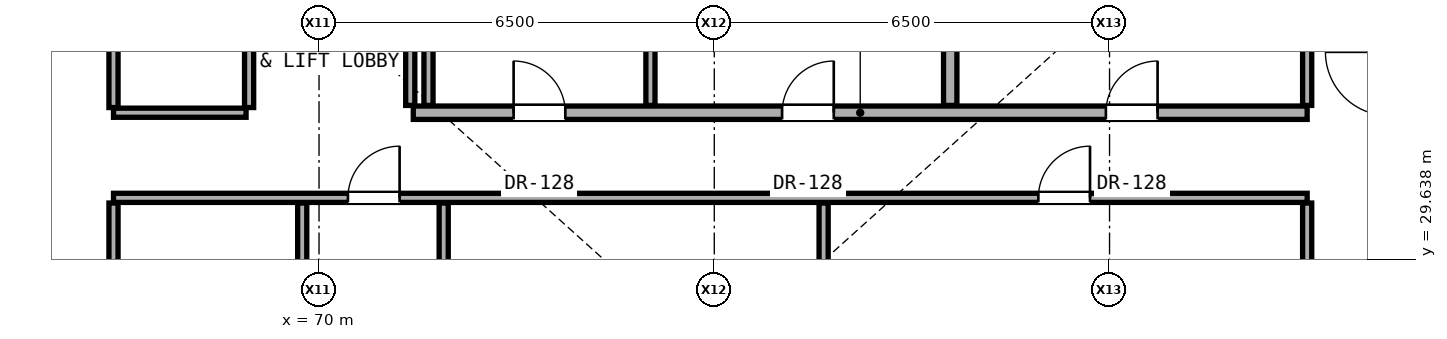
"""IFC4 building model, lengths in metres.
Left out: names, types, materials, properties, quantities, classifications, styles, units other than length and angle.
Written with IfcOpenShell. Run it as: python <this file> out.ifc"""

import sys

from ifc_helpers import new_model, si_unit, direction, frame, frame_2d, origin, place, context, subcontext, project, spatial, rectangle, extrude, element, fill, save


model = new_model("IFC4")
c1 = context("Model", 3, precision=1e-05, world=origin(), true_north=direction((0.0, 1.0)))
c2 = subcontext(c1, "Body", "Model", "MODEL_VIEW")
j1 = project(units=[si_unit("LENGTHUNIT", "METRE"), si_unit("PLANEANGLEUNIT", "RADIAN")], contexts=[c1])
p1 = place(None, origin())
s1 = spatial("IfcSite", under=j1, at=p1, CompositionType="ELEMENT")
p2 = place(p1, origin())
s2 = spatial("IfcBuilding", under=s1, at=p2, CompositionType="ELEMENT")
p3 = place(p2, frame((0.0, 0.0, 22.4)))
s3 = spatial("IfcBuildingStorey", under=s2, at=p3, CompositionType="ELEMENT", Elevation=22.4)
p4 = place(p3, frame((66.62, 30.65, 0.0), z_axis=(0.0, 0.0, 1.0), x_axis=(1.0, 0.0, 0.0)))
e1 = element("IfcWall", 1, at=p4, inside=s3, PredefinedType="PARTITIONING", context=c2, shape_type="SweptSolid", body=[
    extrude(rectangle(XDim=19.63, YDim=0.15, at=frame_2d((9.815, 0.0))), origin(), (0.0, 0.0, 1.0), 2.125),
])
p5 = place(p4, frame((3.855, 0.0, 0.0)))
e2 = element("IfcOpeningElement", 2, at=p5, cuts=e1, PredefinedType="OPENING", context=c2, shape_type="SweptSolid", body=[
    extrude(rectangle(XDim=0.85, YDim=2.01, at=frame_2d((0.425, 1.005))), frame((0.0, 0.085, 0.0), z_axis=(0.0, -1.0, 0.0), x_axis=(1.0, 0.0, 0.0)), (0.0, 0.0, 1.0), 0.17),
])
p6 = place(p4, frame((15.209, 0.0, 0.0)))
e3 = element("IfcOpeningElement", 3, at=p6, cuts=e1, PredefinedType="OPENING", context=c2, shape_type="SweptSolid", body=[
    extrude(rectangle(XDim=0.85, YDim=2.01, at=frame_2d((0.425, 1.005))), frame((0.0, 0.085, 0.0), z_axis=(0.0, -1.0, 0.0), x_axis=(1.0, 0.0, 0.0)), (0.0, 0.0, 1.0), 0.17),
])
p7 = place(p3, frame((66.62, 32.05, 0.0), z_axis=(0.0, 0.0, 1.0), x_axis=(1.0, 0.0, 0.0)))
e4 = element("IfcWall", 4, at=p7, inside=s3, PredefinedType="PARTITIONING", context=c2, shape_type="SweptSolid", body=[
    extrude(rectangle(XDim=2.18, YDim=0.15, at=frame_2d((1.09, 0.0))), origin(), (0.0, 0.0, 1.0), 2.125),
])
p8 = place(p3, frame((71.55, 32.05, 0.0), z_axis=(0.0, 0.0, 1.0), x_axis=(1.0, 0.0, 0.0)))
e5 = element("IfcWall", 5, at=p8, inside=s3, PredefinedType="SOLIDWALL", context=c2, shape_type="SweptSolid", body=[
    extrude(rectangle(XDim=14.7, YDim=0.22, at=frame_2d((7.35, 0.0))), origin(), (0.0, 0.0, 1.0), 2.125),
])
p9 = place(p8, frame((11.39, 0.0, 0.0)))
e6 = element("IfcOpeningElement", 6, at=p9, cuts=e5, PredefinedType="OPENING", context=c2, shape_type="SweptSolid", body=[
    extrude(rectangle(XDim=0.85, YDim=2.01, at=frame_2d((0.425, 1.005))), frame((0.0, 0.12, 0.0), z_axis=(0.0, -1.0, 0.0), x_axis=(1.0, 0.0, 0.0)), (0.0, 0.0, 1.0), 0.24),
])
p10 = place(p8, frame((6.065, 0.0, 0.0)))
e7 = element("IfcOpeningElement", 7, at=p10, cuts=e5, PredefinedType="OPENING", context=c2, shape_type="SweptSolid", body=[
    extrude(rectangle(XDim=0.85, YDim=2.01, at=frame_2d((0.425, 1.005))), frame((0.0, 0.12, 0.0), z_axis=(0.0, -1.0, 0.0), x_axis=(1.0, 0.0, 0.0)), (0.0, 0.0, 1.0), 0.24),
])
p11 = place(p8, frame((1.65, 0.0, 0.0)))
e8 = element("IfcOpeningElement", 8, at=p11, cuts=e5, PredefinedType="OPENING", context=c2, shape_type="SweptSolid", body=[
    extrude(rectangle(XDim=0.85, YDim=2.01, at=frame_2d((0.425, 1.005))), frame((0.0, 0.12, 0.0), z_axis=(0.0, -1.0, 0.0), x_axis=(1.0, 0.0, 0.0)), (0.0, 0.0, 1.0), 0.24),
])
p12 = place(p3, frame((66.62, 24.935, 0.0), z_axis=(0.0, 0.0, 1.0), x_axis=(0.0, 1.0, 0.0)))
e9 = element("IfcWall", 9, at=p12, inside=s3, PredefinedType="PARTITIONING", context=c2, shape_type="SweptSolid", body=[
    extrude(rectangle(XDim=5.63, YDim=0.15, at=frame_2d((2.815, 0.0))), origin(), (0.0, 0.0, 1.0), 2.279),
])
p13 = place(p12, frame((2.34, 0.0, 0.0)))
e10 = element("IfcOpeningElement", 10, at=p13, cuts=e9, PredefinedType="OPENING", context=c2, shape_type="SweptSolid", body=[
    extrude(rectangle(XDim=0.95, YDim=2.15, at=frame_2d((0.475, 1.075))), frame((0.0, 0.085, 0.0), z_axis=(0.0, -1.0, 0.0), x_axis=(1.0, 0.0, 0.0)), (0.0, 0.0, 1.0), 0.17),
])
p14 = place(p3, frame((66.62, 32.135, 0.0), z_axis=(0.0, 0.0, 1.0), x_axis=(0.0, 1.0, 0.0)))
e11 = element("IfcWall", 11, at=p14, inside=s3, PredefinedType="PARTITIONING", context=c2, shape_type="SweptSolid", body=[
    extrude(rectangle(XDim=3.48, YDim=0.15, at=frame_2d((1.74, 0.0))), origin(), (0.0, 0.0, 1.0), 2.452),
])
p15 = place(p3, frame((68.85, 32.135, 0.0), z_axis=(0.0, 0.0, 1.0), x_axis=(0.0, 1.0, 0.0)))
e12 = element("IfcWall", 12, at=p15, inside=s3, PredefinedType="PARTITIONING", context=c2, shape_type="SweptSolid", body=[
    extrude(rectangle(XDim=2.695, YDim=0.15, at=frame_2d((1.348, 0.0))), origin(), (0.0, 0.0, 1.0), 3.06),
])
p16 = place(p3, frame((69.723, 24.935, 0.0), z_axis=(0.0, 0.0, 1.0), x_axis=(0.0, 1.0, 0.0)))
e13 = element("IfcWall", 13, at=p16, inside=s3, PredefinedType="PARTITIONING", context=c2, shape_type="SweptSolid", body=[
    extrude(rectangle(XDim=5.63, YDim=0.15, at=frame_2d((2.815, 0.0))), origin(), (0.0, 0.0, 1.0), 2.125),
])
for number, where, z_axis, x_axis in (
    (14, (71.5, 32.17, 0.0), (0.0, 0.0, 1.0), (0.0, 1.0, 0.0)),
    (15, (71.8, 32.17, 0.0), (0.0, 0.0, 1.0), (0.0, 1.0, 0.0)),
):
    element("IfcWall", number, at=place(p3, frame(where, z_axis=z_axis, x_axis=x_axis)), inside=s3, PredefinedType="PARTITIONING", context=c2, shape_type="SweptSolid", body=[
        extrude(rectangle(XDim=2.66, YDim=0.15, at=frame_2d((1.33, 0.0))), origin(), (0.0, 0.0, 1.0), 3.06),
    ])
p17 = place(p3, frame((72.05, 22.435, 0.0), z_axis=(0.0, 0.0, 1.0), x_axis=(0.0, 1.0, 0.0)))
e16 = element("IfcWall", 16, at=p17, inside=s3, PredefinedType="PARTITIONING", context=c2, shape_type="SweptSolid", body=[
    extrude(rectangle(XDim=8.13, YDim=0.15, at=frame_2d((4.065, 0.0))), origin(), (0.0, 0.0, 1.0), 2.125),
])
p18 = place(p3, frame((75.45, 32.17, 0.0), z_axis=(0.0, 0.0, 1.0), x_axis=(0.0, 1.0, 0.0)))
e17 = element("IfcWall", 17, at=p18, inside=s3, PredefinedType="PARTITIONING", context=c2, shape_type="SweptSolid", body=[
    extrude(rectangle(XDim=2.66, YDim=0.15, at=frame_2d((1.33, 0.0))), origin(), (0.0, 0.0, 1.0), 3.06),
])
p19 = place(p3, frame((78.298, 22.435, 0.0), z_axis=(0.0, 0.0, 1.0), x_axis=(0.0, 1.0, 0.0)))
e18 = element("IfcWall", 18, at=p19, inside=s3, PredefinedType="PARTITIONING", context=c2, shape_type="SweptSolid", body=[
    extrude(rectangle(XDim=8.13, YDim=0.15, at=frame_2d((4.065, 0.0))), origin(), (0.0, 0.0, 1.0), 2.125),
])
p20 = place(p3, frame((80.38, 32.17, 0.0), z_axis=(0.0, 0.0, 1.0), x_axis=(0.0, 1.0, 0.0)))
e19 = element("IfcWall", 19, at=p20, inside=s3, PredefinedType="SOLIDWALL", context=c2, shape_type="SweptSolid", body=[
    extrude(rectangle(XDim=2.66, YDim=0.22, at=frame_2d((1.33, 0.0))), origin(), (0.0, 0.0, 1.0), 3.06),
])
p21 = place(p3, frame((86.25, 22.435, 0.0), z_axis=(0.0, 0.0, 1.0), x_axis=(0.0, 1.0, 0.0)))
e20 = element("IfcWall", 20, at=p21, inside=s3, PredefinedType="PARTITIONING", context=c2, shape_type="SweptSolid", body=[
    extrude(rectangle(XDim=8.13, YDim=0.15, at=frame_2d((4.065, 0.0))), origin(), (0.0, 0.0, 1.0), 2.279),
])
p22 = place(p3, frame((86.25, 32.17, 0.0), z_axis=(0.0, 0.0, 1.0), x_axis=(0.0, 1.0, 0.0)))
e21 = element("IfcWall", 21, at=p22, inside=s3, PredefinedType="PARTITIONING", context=c2, shape_type="SweptSolid", body=[
    extrude(rectangle(XDim=2.795, YDim=0.15, at=frame_2d((1.397, 0.0))), origin(), (0.0, 0.0, 1.0), 2.452),
])
p23 = place(p9, origin())
e22 = element("IfcDoor", 22, at=p23, inside=s3, OperationType="SINGLE_SWING_RIGHT", PredefinedType="DOOR", context=c2, shape_type="SweptSolid", body=[
    extrude(rectangle(XDim=0.85, YDim=2.01, at=frame_2d((0.425, 1.005))), frame((0.0, 0.025, 0.0), z_axis=(0.0, -1.0, 0.0), x_axis=(1.0, 0.0, 0.0)), (0.0, 0.0, 1.0), 0.05),
])
fill(e6, e22)
p24 = place(p10, origin())
e23 = element("IfcDoor", 23, at=p24, inside=s3, OperationType="SINGLE_SWING_RIGHT", PredefinedType="DOOR", context=c2, shape_type="SweptSolid", body=[
    extrude(rectangle(XDim=0.85, YDim=2.01, at=frame_2d((0.425, 1.005))), frame((0.0, 0.025, 0.0), z_axis=(0.0, -1.0, 0.0), x_axis=(1.0, 0.0, 0.0)), (0.0, 0.0, 1.0), 0.05),
])
fill(e7, e23)
p25 = place(p11, origin())
e24 = element("IfcDoor", 24, at=p25, inside=s3, OperationType="SINGLE_SWING_LEFT", PredefinedType="DOOR", context=c2, shape_type="SweptSolid", body=[
    extrude(rectangle(XDim=0.85, YDim=2.01, at=frame_2d((0.425, 1.005))), frame((0.0, 0.025, 0.0), z_axis=(0.0, -1.0, 0.0), x_axis=(1.0, 0.0, 0.0)), (0.0, 0.0, 1.0), 0.05),
])
fill(e8, e24)
p26 = place(p5, origin())
e25 = element("IfcDoor", 25, at=p26, inside=s3, OperationType="SINGLE_SWING_RIGHT", PredefinedType="DOOR", context=c2, shape_type="SweptSolid", body=[
    extrude(rectangle(XDim=0.85, YDim=2.01, at=frame_2d((0.425, 1.005))), frame((0.0, 0.025, 0.0), z_axis=(0.0, -1.0, 0.0), x_axis=(1.0, 0.0, 0.0)), (0.0, 0.0, 1.0), 0.05),
])
fill(e2, e25)
p27 = place(p6, origin())
e26 = element("IfcDoor", 26, at=p27, inside=s3, OperationType="SINGLE_SWING_RIGHT", PredefinedType="DOOR", context=c2, shape_type="SweptSolid", body=[
    extrude(rectangle(XDim=0.85, YDim=2.01, at=frame_2d((0.425, 1.005))), frame((0.0, 0.025, 0.0), z_axis=(0.0, -1.0, 0.0), x_axis=(1.0, 0.0, 0.0)), (0.0, 0.0, 1.0), 0.05),
])
fill(e3, e26)
save(model, sys.argv[1])
